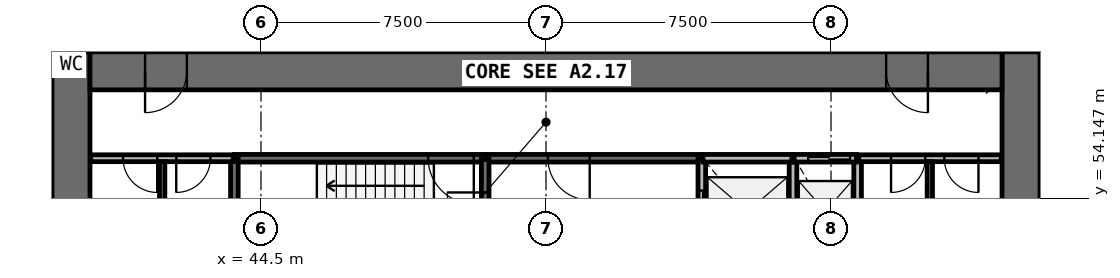
"""IFC4 building model, lengths in metres.
Left out: names, types, materials, properties, quantities, classifications, styles, units other than length and angle.
Written with IfcOpenShell. Run it as: python <this file> out.ifc"""

import sys

from ifc_helpers import new_model, si_unit, direction, frame, frame_2d, origin, place, context, subcontext, project, spatial, rectangle, extrude, source, transform, mapped, element, fill, save


model = new_model("IFC4")
c1 = context("Model", 3, precision=1e-05, world=origin(), true_north=direction((0.0, 1.0)))
c2 = subcontext(c1, "Body", "Model", "MODEL_VIEW")
j1 = project(units=[si_unit("LENGTHUNIT", "METRE"), si_unit("PLANEANGLEUNIT", "RADIAN")], contexts=[c1])
p1 = place(None, origin())
s1 = spatial("IfcSite", under=j1, at=p1, CompositionType="ELEMENT")
p2 = place(p1, origin())
s2 = spatial("IfcBuilding", under=s1, at=p2, CompositionType="ELEMENT")
p3 = place(p2, frame((0.0, 0.0, 71.0)))
s3 = spatial("IfcBuildingStorey", under=s2, at=p3, CompositionType="ELEMENT", Elevation=71.0)
p4 = place(p3, frame((64.5, 38.0, 0.0), z_axis=(0.0, 0.0, 1.0), x_axis=(0.0, 1.0, 0.0)))
e1 = element("IfcWall", 1, at=p4, inside=s3, PredefinedType="SHEAR", context=c2, shape_type="SweptSolid", body=[
    extrude(rectangle(XDim=20.0, YDim=1.0, at=frame_2d((10.0, 0.0))), origin(), (0.0, 0.0, 1.0), 4.4),
])
p5 = place(p4, frame((9.1, 0.0, 0.0)))
e2 = element("IfcOpeningElement", 2, at=p5, cuts=e1, PredefinedType="OPENING", context=c2, shape_type="SweptSolid", body=[
    extrude(rectangle(XDim=1.8, YDim=2.1, at=frame_2d((0.9, 1.05))), frame((0.0, 0.51, 0.0), z_axis=(0.0, -1.0, 0.0), x_axis=(1.0, 0.0, 0.0)), (0.0, 0.0, 1.0), 1.02),
])
p6 = place(p3, frame((39.5, 58.0, 0.0), z_axis=(0.0, 0.0, 1.0), x_axis=(0.0, -1.0, 0.0)))
e3 = element("IfcWall", 3, at=p6, inside=s3, PredefinedType="SHEAR", context=c2, shape_type="SweptSolid", body=[
    extrude(rectangle(XDim=20.0, YDim=1.0, at=frame_2d((10.0, 0.0))), origin(), (0.0, 0.0, 1.0), 4.4),
])
p7 = place(p6, frame((9.1, 0.0, 0.0)))
e4 = element("IfcOpeningElement", 4, at=p7, cuts=e3, PredefinedType="OPENING", context=c2, shape_type="SweptSolid", body=[
    extrude(rectangle(XDim=1.8, YDim=2.1, at=frame_2d((0.9, 1.05))), frame((0.0, 0.51, 0.0), z_axis=(0.0, -1.0, 0.0), x_axis=(1.0, 0.0, 0.0)), (0.0, 0.0, 1.0), 1.02),
])
p8 = place(p3, frame((64.0, 57.5, 0.0), z_axis=(0.0, 0.0, 1.0), x_axis=(-1.0, 0.0, 0.0)))
e5 = element("IfcWall", 5, at=p8, inside=s3, PredefinedType="SHEAR", context=c2, shape_type="SweptSolid", body=[
    extrude(rectangle(XDim=24.0, YDim=1.0, at=frame_2d((12.0, 0.0))), origin(), (0.0, 0.0, 1.0), 4.4),
])
p9 = place(p8, frame((21.45, 0.0, 0.0)))
e6 = element("IfcOpeningElement", 6, at=p9, cuts=e5, PredefinedType="OPENING", context=c2, shape_type="SweptSolid", body=[
    extrude(rectangle(XDim=1.1, YDim=2.1, at=frame_2d((0.55, 1.05))), frame((0.0, 0.51, 0.0), z_axis=(0.0, -1.0, 0.0), x_axis=(1.0, 0.0, 0.0)), (0.0, 0.0, 1.0), 1.02),
])
p10 = place(p8, frame((1.95, 0.0, 0.0)))
e7 = element("IfcOpeningElement", 7, at=p10, cuts=e5, PredefinedType="OPENING", context=c2, shape_type="SweptSolid", body=[
    extrude(rectangle(XDim=1.1, YDim=2.1, at=frame_2d((0.55, 1.05))), frame((0.0, 0.51, 0.0), z_axis=(0.0, -1.0, 0.0), x_axis=(1.0, 0.0, 0.0)), (0.0, 0.0, 1.0), 1.02),
])
p11 = place(p3, frame((50.4, 55.2, 0.0), z_axis=(0.0, 0.0, 1.0), x_axis=(-1.0, 0.0, 0.0)))
e8 = element("IfcWall", 8, at=p11, inside=s3, PredefinedType="SOLIDWALL", context=c2, shape_type="SweptSolid", body=[
    extrude(rectangle(XDim=6.6, YDim=0.2, at=frame_2d((3.3, 0.0))), origin(), (0.0, 0.0, 1.0), 3.9),
])
p12 = place(p11, frame((0.3, 0.0, 0.0)))
e9 = element("IfcOpeningElement", 9, at=p12, cuts=e8, PredefinedType="OPENING", context=c2, shape_type="SweptSolid", body=[
    extrude(rectangle(XDim=1.2, YDim=2.1, at=frame_2d((0.6, 1.05))), frame((0.0, 0.11, 0.0), z_axis=(0.0, -1.0, 0.0), x_axis=(1.0, 0.0, 0.0)), (0.0, 0.0, 1.0), 0.22),
])
p13 = place(p3, frame((56.1, 55.2, 0.0), z_axis=(0.0, 0.0, 1.0), x_axis=(-1.0, 0.0, 0.0)))
e10 = element("IfcWall", 10, at=p13, inside=s3, PredefinedType="SOLIDWALL", context=c2, shape_type="SweptSolid", body=[
    extrude(rectangle(XDim=5.67, YDim=0.2, at=frame_2d((2.835, 0.0))), origin(), (0.0, 0.0, 1.0), 3.9),
])
p14 = place(p13, frame((2.95, 0.0, 0.0)))
e11 = element("IfcOpeningElement", 11, at=p14, cuts=e10, PredefinedType="OPENING", context=c2, shape_type="SweptSolid", body=[
    extrude(rectangle(XDim=1.1, YDim=2.1, at=frame_2d((0.55, 1.05))), frame((0.0, 0.11, 0.0), z_axis=(0.0, -1.0, 0.0), x_axis=(1.0, 0.0, 0.0)), (0.0, 0.0, 1.0), 0.22),
])
p15 = place(p3, frame((50.4, 52.4, 0.0), z_axis=(0.0, 0.0, 1.0), x_axis=(0.0, 1.0, 0.0)))
e12 = element("IfcWall", 12, at=p15, inside=s3, PredefinedType="SOLIDWALL", context=c2, shape_type="SweptSolid", body=[
    extrude(rectangle(XDim=2.77, YDim=0.2, at=frame_2d((1.385, 0.0))), origin(), (0.0, 0.0, 1.0), 3.9),
])
p16 = place(p15, frame((0.9, 0.0, 0.0)))
e13 = element("IfcOpeningElement", 13, at=p16, cuts=e12, PredefinedType="OPENING", context=c2, shape_type="SweptSolid", body=[
    extrude(rectangle(XDim=1.0, YDim=2.1, at=frame_2d((0.5, 1.05))), frame((0.0, 0.11, 0.0), z_axis=(0.0, -1.0, 0.0), x_axis=(1.0, 0.0, 0.0)), (0.0, 0.0, 1.0), 0.22),
])
p17 = place(p3, frame((56.1, 55.17, 0.0), z_axis=(0.0, 0.0, 1.0), x_axis=(0.0, -1.0, 0.0)))
e14 = element("IfcWall", 14, at=p17, inside=s3, PredefinedType="SOLIDWALL", context=c2, shape_type="SweptSolid", body=[
    extrude(rectangle(XDim=2.77, YDim=0.2, at=frame_2d((1.385, 0.0))), origin(), (0.0, 0.0, 1.0), 3.9),
])
p18 = place(p17, frame((0.82, 0.0, 0.0)))
e15 = element("IfcOpeningElement", 15, at=p18, cuts=e14, PredefinedType="OPENING", context=c2, shape_type="SweptSolid", body=[
    extrude(rectangle(XDim=1.1, YDim=2.1, at=frame_2d((0.55, 1.05))), frame((0.0, 0.11, 0.0), z_axis=(0.0, -1.0, 0.0), x_axis=(1.0, 0.0, 0.0)), (0.0, 0.0, 1.0), 0.22),
])
for number, where, z_axis, x_axis in (
    (16, (58.5, 52.4, 0.0), (0.0, 0.0, 1.0), (0.0, 1.0, 0.0)),
    (17, (60.2, 52.4, 0.0), (0.0, 0.0, 1.0), (0.0, 1.0, 0.0)),
):
    element("IfcWall", number, at=place(p3, frame(where, z_axis=z_axis, x_axis=x_axis)), inside=s3, PredefinedType="SOLIDWALL", context=c2, shape_type="SweptSolid", body=[
        extrude(rectangle(XDim=2.8, YDim=0.2, at=frame_2d((1.4, 0.0))), origin(), (0.0, 0.0, 1.0), 3.9),
    ])
p19 = place(p3, frame((58.47, 55.2, 0.0), z_axis=(0.0, 0.0, 1.0), x_axis=(-1.0, 0.0, 0.0)))
e18 = element("IfcWall", 18, at=p19, inside=s3, PredefinedType="SOLIDWALL", context=c2, shape_type="SweptSolid", body=[
    extrude(rectangle(XDim=2.34, YDim=0.2, at=frame_2d((1.17, 0.0))), origin(), (0.0, 0.0, 1.0), 3.9),
])
p20 = place(p3, frame((43.8, 55.17, 0.0), z_axis=(0.0, 0.0, 1.0), x_axis=(0.0, -1.0, 0.0)))
e19 = element("IfcWall", 19, at=p20, inside=s3, PredefinedType="SOLIDWALL", context=c2, shape_type="SweptSolid", body=[
    extrude(rectangle(XDim=2.14, YDim=0.2, at=frame_2d((1.07, 0.0))), origin(), (0.0, 0.0, 1.0), 3.9),
])
p21 = place(p3, frame((60.17, 55.2, 0.0), z_axis=(0.0, 0.0, 1.0), x_axis=(-1.0, 0.0, 0.0)))
e20 = element("IfcWall", 20, at=p21, inside=s3, PredefinedType="SOLIDWALL", context=c2, shape_type="SweptSolid", body=[
    extrude(rectangle(XDim=1.64, YDim=0.2, at=frame_2d((0.82, 0.0))), origin(), (0.0, 0.0, 1.0), 3.9),
])
p22 = place(p21, frame((0.17, 0.0, 0.0)))
e21 = element("IfcOpeningElement", 21, at=p22, cuts=e20, PredefinedType="OPENING", context=c2, shape_type="SweptSolid", body=[
    extrude(rectangle(XDim=1.1, YDim=2.1, at=frame_2d((0.55, 1.05))), frame((0.0, 0.11, 0.0), z_axis=(0.0, -1.0, 0.0), x_axis=(1.0, 0.0, 0.0)), (0.0, 0.0, 1.0), 0.22),
])
p23 = place(p3, frame((43.77, 55.2, 0.0), z_axis=(0.0, 0.0, 1.0), x_axis=(-1.0, 0.0, 0.0)))
e22 = element("IfcWall", 22, at=p23, inside=s3, PredefinedType="PARTITIONING", context=c2, shape_type="SweptSolid", body=[
    extrude(rectangle(XDim=3.75, YDim=0.18, at=frame_2d((1.875, 0.0))), origin(), (0.0, 0.0, 1.0), 3.9),
])
p24 = place(p23, frame((2.0, 0.0, 0.0)))
e23 = element("IfcOpeningElement", 23, at=p24, cuts=e22, PredefinedType="OPENING", context=c2, shape_type="SweptSolid", body=[
    extrude(rectangle(XDim=0.9, YDim=2.1, at=frame_2d((0.45, 1.05))), frame((0.0, 0.1, 0.0), z_axis=(0.0, -1.0, 0.0), x_axis=(1.0, 0.0, 0.0)), (0.0, 0.0, 1.0), 0.2),
])
p25 = place(p23, frame((0.6, 0.0, 0.0)))
e24 = element("IfcOpeningElement", 24, at=p25, cuts=e22, PredefinedType="OPENING", context=c2, shape_type="SweptSolid", body=[
    extrude(rectangle(XDim=0.9, YDim=2.1, at=frame_2d((0.45, 1.05))), frame((0.0, 0.1, 0.0), z_axis=(0.0, -1.0, 0.0), x_axis=(1.0, 0.0, 0.0)), (0.0, 0.0, 1.0), 0.2),
])
p26 = place(p3, frame((63.98, 55.2, 0.0), z_axis=(0.0, 0.0, 1.0), x_axis=(-1.0, 0.0, 0.0)))
e25 = element("IfcWall", 25, at=p26, inside=s3, PredefinedType="PARTITIONING", context=c2, shape_type="SweptSolid", body=[
    extrude(rectangle(XDim=3.75, YDim=0.18, at=frame_2d((1.875, 0.0))), origin(), (0.0, 0.0, 1.0), 3.9),
])
p27 = place(p26, frame((2.0, 0.0, 0.0)))
e26 = element("IfcOpeningElement", 26, at=p27, cuts=e25, PredefinedType="OPENING", context=c2, shape_type="SweptSolid", body=[
    extrude(rectangle(XDim=0.9, YDim=2.1, at=frame_2d((0.45, 1.05))), frame((0.0, 0.1, 0.0), z_axis=(0.0, -1.0, 0.0), x_axis=(1.0, 0.0, 0.0)), (0.0, 0.0, 1.0), 0.2),
])
p28 = place(p26, frame((0.6, 0.0, 0.0)))
e27 = element("IfcOpeningElement", 27, at=p28, cuts=e25, PredefinedType="OPENING", context=c2, shape_type="SweptSolid", body=[
    extrude(rectangle(XDim=0.9, YDim=2.1, at=frame_2d((0.45, 1.05))), frame((0.0, 0.1, 0.0), z_axis=(0.0, -1.0, 0.0), x_axis=(1.0, 0.0, 0.0)), (0.0, 0.0, 1.0), 0.2),
])
p29 = place(p3, frame((62.1, 52.4, 0.0), z_axis=(0.0, 0.0, 1.0), x_axis=(0.0, 1.0, 0.0)))
e28 = element("IfcWall", 28, at=p29, inside=s3, PredefinedType="PARTITIONING", context=c2, shape_type="SweptSolid", body=[
    extrude(rectangle(XDim=2.71, YDim=0.14, at=frame_2d((1.355, 0.0))), origin(), (0.0, 0.0, 1.0), 3.0),
])
p30 = place(p3, frame((41.9, 53.1, 0.0), z_axis=(0.0, 0.0, 1.0), x_axis=(0.0, 1.0, 0.0)))
e29 = element("IfcWall", 29, at=p30, inside=s3, PredefinedType="PARTITIONING", context=c2, shape_type="SweptSolid", body=[
    extrude(rectangle(XDim=2.01, YDim=0.14, at=frame_2d((1.005, 0.0))), origin(), (0.0, 0.0, 1.0), 3.0),
])
m1 = source(origin(), c2, "Body", "SweptSolid", [
    extrude(rectangle(XDim=1.1, YDim=2.1, at=frame_2d((0.55, 1.05))), frame((0.0, 0.025, 0.0), z_axis=(0.0, -1.0, 0.0), x_axis=(1.0, 0.0, 0.0)), (0.0, 0.0, 1.0), 0.05),
])
p31 = place(p18, origin())
e30 = element("IfcDoor", 30, at=p31, inside=s3, OperationType="DOUBLE_DOOR_SLIDING", PredefinedType="USERDEFINED", context=c2, shape_type="MappedRepresentation", body=[
    mapped(m1, transform((0.0, 0.0, 0.0), scale=1.0)),
])
fill(e15, e30)
p32 = place(p22, origin())
e31 = element("IfcDoor", 31, at=p32, inside=s3, OperationType="DOUBLE_DOOR_SLIDING", PredefinedType="USERDEFINED", context=c2, shape_type="MappedRepresentation", body=[
    mapped(m1, transform((0.0, 0.0, 0.0), scale=1.0)),
])
fill(e21, e31)
m2 = source(origin(), c2, "Body", "SweptSolid", [
    extrude(rectangle(XDim=1.2, YDim=2.1, at=frame_2d((0.6, 1.05))), frame((0.0, 0.025, 0.0), z_axis=(0.0, -1.0, 0.0), x_axis=(1.0, 0.0, 0.0)), (0.0, 0.0, 1.0), 0.05),
])
p33 = place(p12, origin())
e32 = element("IfcDoor", 32, at=p33, inside=s3, OperationType="SINGLE_SWING_LEFT", PredefinedType="DOOR", context=c2, shape_type="MappedRepresentation", body=[
    mapped(m2, transform((0.0, 0.0, 0.0), scale=1.0)),
])
fill(e9, e32)
m3 = source(origin(), c2, "Body", "SweptSolid", [
    extrude(rectangle(XDim=1.0, YDim=2.1, at=frame_2d((0.5, 1.05))), frame((0.0, 0.025, 0.0), z_axis=(0.0, -1.0, 0.0), x_axis=(1.0, 0.0, 0.0)), (0.0, 0.0, 1.0), 0.05),
])
p34 = place(p16, origin())
e33 = element("IfcDoor", 33, at=p34, inside=s3, OperationType="SINGLE_SWING_RIGHT", PredefinedType="DOOR", context=c2, shape_type="MappedRepresentation", body=[
    mapped(m3, transform((0.0, 0.0, 0.0), scale=1.0)),
])
fill(e13, e33)
m4 = source(origin(), c2, "Body", "SweptSolid", [
    extrude(rectangle(XDim=1.1, YDim=2.1, at=frame_2d((0.55, 1.05))), frame((0.0, 0.025, 0.0), z_axis=(0.0, -1.0, 0.0), x_axis=(1.0, 0.0, 0.0)), (0.0, 0.0, 1.0), 0.05),
])
p35 = place(p14, origin())
e34 = element("IfcDoor", 34, at=p35, inside=s3, OperationType="SINGLE_SWING_LEFT", PredefinedType="DOOR", context=c2, shape_type="MappedRepresentation", body=[
    mapped(m4, transform((0.0, 0.0, 0.0), scale=1.0)),
])
fill(e11, e34)
m5 = source(origin(), c2, "Body", "SweptSolid", [
    extrude(rectangle(XDim=1.1, YDim=2.1, at=frame_2d((0.55, 1.05))), frame((0.0, 0.025, 0.0), z_axis=(0.0, -1.0, 0.0), x_axis=(1.0, 0.0, 0.0)), (0.0, 0.0, 1.0), 0.05),
])
p36 = place(p9, origin())
e35 = element("IfcDoor", 35, at=p36, inside=s3, OperationType="SINGLE_SWING_RIGHT", PredefinedType="DOOR", context=c2, shape_type="MappedRepresentation", body=[
    mapped(m5, transform((0.0, 0.0, 0.0), scale=1.0)),
])
fill(e6, e35)
p37 = place(p10, origin())
e36 = element("IfcDoor", 36, at=p37, inside=s3, OperationType="SINGLE_SWING_LEFT", PredefinedType="DOOR", context=c2, shape_type="MappedRepresentation", body=[
    mapped(m5, transform((0.0, 0.0, 0.0), scale=1.0)),
])
fill(e7, e36)
m6 = source(origin(), c2, "Body", "SweptSolid", [
    extrude(rectangle(XDim=0.9, YDim=2.1, at=frame_2d((0.45, 1.05))), frame((0.0, 0.025, 0.0), z_axis=(0.0, -1.0, 0.0), x_axis=(1.0, 0.0, 0.0)), (0.0, 0.0, 1.0), 0.05),
])
p38 = place(p24, origin())
e37 = element("IfcDoor", 37, at=p38, inside=s3, OperationType="SINGLE_SWING_LEFT", PredefinedType="DOOR", context=c2, shape_type="MappedRepresentation", body=[
    mapped(m6, transform((0.0, 0.0, 0.0), scale=1.0)),
])
fill(e23, e37)
p39 = place(p25, origin())
e38 = element("IfcDoor", 38, at=p39, inside=s3, OperationType="SINGLE_SWING_RIGHT", PredefinedType="DOOR", context=c2, shape_type="MappedRepresentation", body=[
    mapped(m6, transform((0.0, 0.0, 0.0), scale=1.0)),
])
fill(e24, e38)
p40 = place(p27, origin())
e39 = element("IfcDoor", 39, at=p40, inside=s3, OperationType="SINGLE_SWING_RIGHT", PredefinedType="DOOR", context=c2, shape_type="MappedRepresentation", body=[
    mapped(m6, transform((0.0, 0.0, 0.0), scale=1.0)),
])
fill(e26, e39)
p41 = place(p28, origin())
e40 = element("IfcDoor", 40, at=p41, inside=s3, OperationType="SINGLE_SWING_LEFT", PredefinedType="DOOR", context=c2, shape_type="MappedRepresentation", body=[
    mapped(m6, transform((0.0, 0.0, 0.0), scale=1.0)),
])
fill(e27, e40)
save(model, sys.argv[1])
